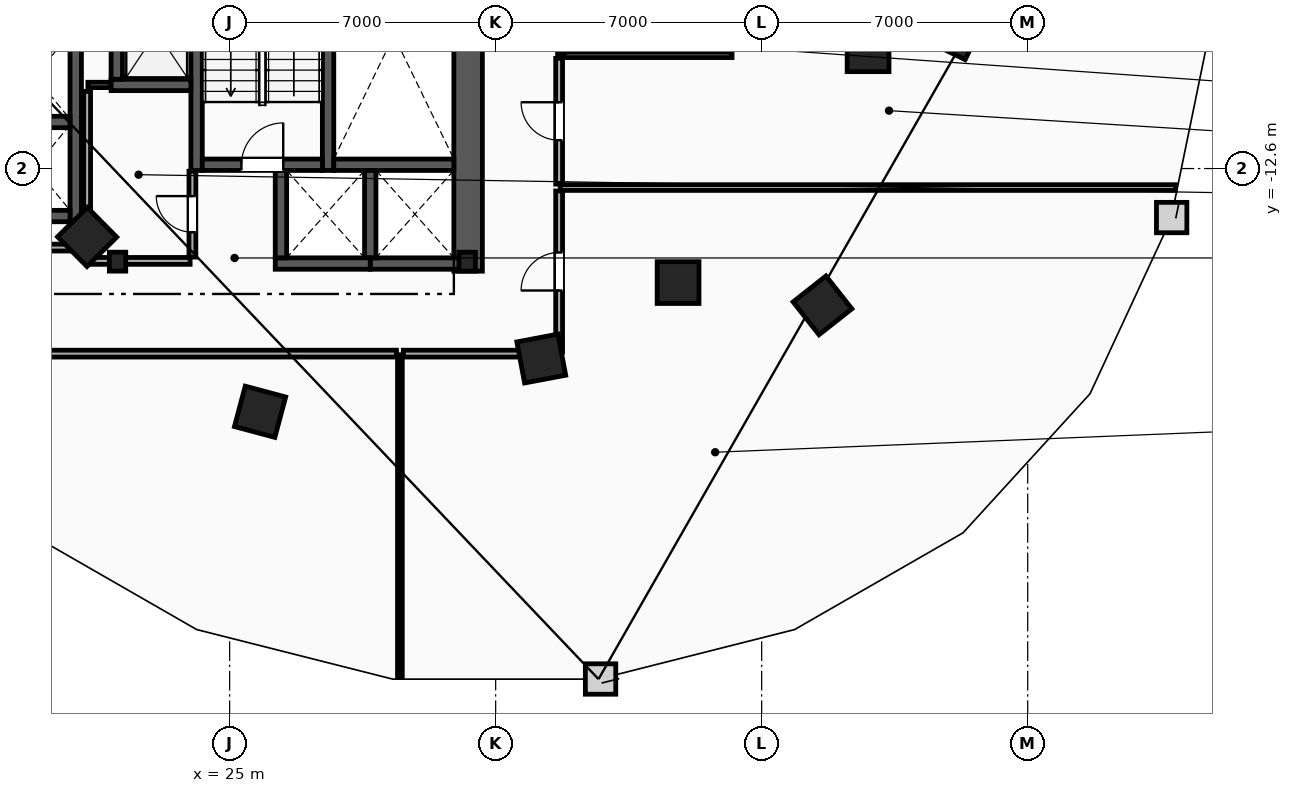
"""IFC4 building model, lengths in metres.
Left out: names, types, materials, properties, quantities, classifications, styles, units other than length and angle.
Written with IfcOpenShell. Run it as: python <this file> out.ifc"""

import sys

from ifc_helpers import new_model, si_unit, direction, frame, frame_2d, origin, origin_2d, place, context, subcontext, project, spatial, rectangle, i_section, extrude, element, fill, save


model = new_model("IFC4")
c1 = context("Model", 3, precision=1e-05, world=origin(), true_north=direction((0.0, 1.0)))
c2 = subcontext(c1, "Body", "Model", "MODEL_VIEW")
j1 = project(units=[si_unit("LENGTHUNIT", "METRE"), si_unit("PLANEANGLEUNIT", "RADIAN")], contexts=[c1])
p1 = place(None, origin())
s1 = spatial("IfcSite", under=j1, at=p1, CompositionType="ELEMENT")
p2 = place(p1, origin())
s2 = spatial("IfcBuilding", under=s1, at=p2, CompositionType="ELEMENT")
p3 = place(p2, frame((0.0, 0.0, 99.8)))
s3 = spatial("IfcBuildingStorey", under=s2, at=p3, CompositionType="ELEMENT", Elevation=99.8)
for number, where, z_axis, x_axis in (
    (1, (22.05, -15.05, 0.0), (0.0, 0.0, 1.0), (1.0, 0.0, 0.0)),
    (2, (31.25, -15.05, 0.0), (0.0, 0.0, 1.0), (1.0, 0.0, 0.0)),
):
    element("IfcColumn", number, at=place(p3, frame(where, z_axis=z_axis, x_axis=x_axis)), inside=s3, PredefinedType="COLUMN", context=c2, shape_type="SweptSolid", body=[
        extrude(i_section(OverallWidth=0.432, OverallDepth=0.498, WebThickness=0.056, FlangeThickness=0.089, FilletRadius=0.018, at=origin_2d()), origin(), (0.0, 0.0, 1.0), 3.6),
    ])
for number, where, z_axis, x_axis in (
    (3, (41.8, -9.5, 0.0), (0.0, 0.0, 1.0), (1.0, 0.0, 0.0)),
    (4, (36.8, -15.6, 0.0), (0.0, 0.0, 1.0), (1.0, 0.0, 0.0)),
    (5, (21.25, -14.4, 0.0), (0.0, 0.0, 1.0), (0.703, -0.711, 0.0)),
    (6, (25.8, -19.0, 0.0), (0.0, 0.0, 1.0), (0.966, -0.259, 0.0)),
    (7, (33.2, -17.6, 0.0), (0.0, 0.0, 1.0), (0.983, 0.186, 0.0)),
    (8, (40.6, -16.2, 0.0), (0.0, 0.0, 1.0), (0.785, 0.619, 0.0)),
    (9, (44.1, -9.0, 0.0), (0.0, 0.0, 1.0), (0.437, 0.899, 0.0)),
):
    element("IfcColumn", number, at=place(p3, frame(where, z_axis=z_axis, x_axis=x_axis)), inside=s3, PredefinedType="COLUMN", context=c2, shape_type="SweptSolid", body=[
        extrude(rectangle(XDim=1.1, YDim=1.1, at=origin_2d()), origin(), (0.0, 0.0, 1.0), 3.6),
    ])
p4 = place(p3, frame((31.275, -15.3, 0.0), z_axis=(0.0, 0.0, 1.0), x_axis=(0.0, 1.0, 0.0)))
e10 = element("IfcWall", 10, at=p4, inside=s3, PredefinedType="SHEAR", context=c2, shape_type="SweptSolid", body=[
    extrude(rectangle(XDim=13.33, YDim=0.75, at=frame_2d((6.665, 0.0))), origin(), (0.0, 0.0, 1.0), 3.3),
])
for number, where, z_axis, x_axis in (
    (11, (27.59, -12.65, 0.0), (0.0, 0.0, 1.0), (0.0, 1.0, 0.0)),
    (12, (24.13, -12.65, 0.0), (0.0, 0.0, 1.0), (0.0, 1.0, 0.0)),
):
    element("IfcWall", number, at=place(p3, frame(where, z_axis=z_axis, x_axis=x_axis)), inside=s3, PredefinedType="SHEAR", context=c2, shape_type="SweptSolid", body=[
        extrude(rectangle(XDim=10.68, YDim=0.3, at=frame_2d((5.34, 0.0))), origin(), (0.0, 0.0, 1.0), 3.3),
    ])
p5 = place(p3, frame((27.74, -12.5, 0.0), z_axis=(0.0, 0.0, 1.0), x_axis=(1.0, 0.0, 0.0)))
e13 = element("IfcWall", 13, at=p5, inside=s3, PredefinedType="SHEAR", context=c2, shape_type="SweptSolid", body=[
    extrude(rectangle(XDim=3.16, YDim=0.3, at=frame_2d((1.58, 0.0))), origin(), (0.0, 0.0, 1.0), 3.3),
])
p6 = place(p3, frame((24.28, -12.5, 0.0), z_axis=(0.0, 0.0, 1.0), x_axis=(1.0, 0.0, 0.0)))
e14 = element("IfcWall", 14, at=p6, inside=s3, PredefinedType="SHEAR", context=c2, shape_type="SweptSolid", body=[
    extrude(rectangle(XDim=3.16, YDim=0.3, at=frame_2d((1.58, 0.0))), origin(), (0.0, 0.0, 1.0), 3.3),
])
p7 = place(p6, frame((1.03, 0.0, 0.0)))
e15 = element("IfcOpeningElement", 15, at=p7, cuts=e14, PredefinedType="OPENING", context=c2, shape_type="SweptSolid", body=[
    extrude(rectangle(XDim=1.1, YDim=2.15, at=frame_2d((0.55, 1.075))), frame((0.0, 0.16, 0.0), z_axis=(0.0, -1.0, 0.0), x_axis=(1.0, 0.0, 0.0)), (0.0, 0.0, 1.0), 0.32),
])
p8 = place(p3, frame((21.88, -10.4, 0.0), z_axis=(0.0, 0.0, 1.0), x_axis=(1.0, 0.0, 0.0)))
e16 = element("IfcWall", 16, at=p8, inside=s3, PredefinedType="SHEAR", context=c2, shape_type="SweptSolid", body=[
    extrude(rectangle(XDim=2.1, YDim=0.3, at=frame_2d((1.05, 0.0))), origin(), (0.0, 0.0, 1.0), 3.3),
])
for number, where, z_axis, x_axis in (
    (17, (22.03, -10.25, 0.0), (0.0, 0.0, 1.0), (0.0, 1.0, 0.0)),
    (18, (28.7, -15.1, 0.0), (0.0, 0.0, 1.0), (1.0, 0.0, 0.0)),
):
    element("IfcWall", number, at=place(p3, frame(where, z_axis=z_axis, x_axis=x_axis)), inside=s3, PredefinedType="SHEAR", context=c2, shape_type="SweptSolid", body=[
        extrude(rectangle(XDim=2.5, YDim=0.3, at=frame_2d((1.25, 0.0))), origin(), (0.0, 0.0, 1.0), 3.3),
    ])
p9 = place(p3, frame((28.7, -14.95, 0.0), z_axis=(0.0, 0.0, 1.0), x_axis=(0.0, 1.0, 0.0)))
e19 = element("IfcWall", 19, at=p9, inside=s3, PredefinedType="SHEAR", context=c2, shape_type="SweptSolid", body=[
    extrude(rectangle(XDim=2.3, YDim=0.3, at=frame_2d((1.15, 0.0))), origin(), (0.0, 0.0, 1.0), 3.3),
])
p10 = place(p3, frame((26.2, -15.1, 0.0), z_axis=(0.0, 0.0, 1.0), x_axis=(1.0, 0.0, 0.0)))
e20 = element("IfcWall", 20, at=p10, inside=s3, PredefinedType="SHEAR", context=c2, shape_type="SweptSolid", body=[
    extrude(rectangle(XDim=2.5, YDim=0.3, at=frame_2d((1.25, 0.0))), origin(), (0.0, 0.0, 1.0), 3.3),
])
p11 = place(p3, frame((26.35, -14.95, 0.0), z_axis=(0.0, 0.0, 1.0), x_axis=(0.0, 1.0, 0.0)))
e21 = element("IfcWall", 21, at=p11, inside=s3, PredefinedType="SHEAR", context=c2, shape_type="SweptSolid", body=[
    extrude(rectangle(XDim=2.3, YDim=0.3, at=frame_2d((1.15, 0.0))), origin(), (0.0, 0.0, 1.0), 3.3),
])
p12 = place(p3, frame((20.95, -14.0, 0.0), z_axis=(0.0, 0.0, 1.0), x_axis=(0.0, 1.0, 0.0)))
e22 = element("IfcWall", 22, at=p12, inside=s3, PredefinedType="SHEAR", context=c2, shape_type="SweptSolid", body=[
    extrude(rectangle(XDim=10.05, YDim=0.3, at=frame_2d((5.025, 0.0))), origin(), (0.0, 0.0, 1.0), 3.3),
])
for number, where, z_axis, x_axis in (
    (23, (18.95, -13.85, 0.0), (0.0, 0.0, 1.0), (1.0, 0.0, 0.0)),
    (24, (18.95, -11.375, 0.0), (0.0, 0.0, 1.0), (1.0, 0.0, 0.0)),
):
    element("IfcWall", number, at=place(p3, frame(where, z_axis=z_axis, x_axis=x_axis)), inside=s3, PredefinedType="SHEAR", context=c2, shape_type="SweptSolid", body=[
        extrude(rectangle(XDim=1.85, YDim=0.3, at=frame_2d((0.925, 0.0))), origin(), (0.0, 0.0, 1.0), 3.3),
    ])
p13 = place(p3, frame((21.27, -10.4, 0.0), z_axis=(0.0, 0.0, 1.0), x_axis=(1.0, 0.0, 0.0)))
e25 = element("IfcWall", 25, at=p13, inside=s3, PredefinedType="PARTITIONING", context=c2, shape_type="SweptSolid", body=[
    extrude(rectangle(XDim=0.59, YDim=0.14, at=frame_2d((0.295, 0.0))), origin(), (0.0, 0.0, 1.0), 3.3),
])
p14 = place(p3, frame((21.25, -14.93, 0.0), z_axis=(0.0, 0.0, 1.0), x_axis=(0.0, 1.0, 0.0)))
e26 = element("IfcWall", 26, at=p14, inside=s3, PredefinedType="PARTITIONING", context=c2, shape_type="SweptSolid", body=[
    extrude(rectangle(XDim=4.36, YDim=0.18, at=frame_2d((2.18, 0.0))), origin(), (0.0, 0.0, 1.0), 3.3),
])
p15 = place(p3, frame((21.35, -15.03, 0.0), z_axis=(0.0, 0.0, 1.0), x_axis=(1.0, 0.0, 0.0)))
e27 = element("IfcWall", 27, at=p15, inside=s3, PredefinedType="PARTITIONING", context=c2, shape_type="SweptSolid", body=[
    extrude(rectangle(XDim=2.61, YDim=0.18, at=frame_2d((1.305, 0.0))), origin(), (0.0, 0.0, 1.0), 2.373),
])
p16 = place(p3, frame((24.02, -14.93, 0.0), z_axis=(0.0, 0.0, 1.0), x_axis=(0.0, 1.0, 0.0)))
e28 = element("IfcWall", 28, at=p16, inside=s3, PredefinedType="PARTITIONING", context=c2, shape_type="SweptSolid", body=[
    extrude(rectangle(XDim=2.26, YDim=0.18, at=frame_2d((1.13, 0.0))), origin(), (0.0, 0.0, 1.0), 3.3),
])
p17 = place(p16, frame((0.655, 0.0, 0.0)))
e29 = element("IfcOpeningElement", 29, at=p17, cuts=e28, PredefinedType="OPENING", context=c2, shape_type="SweptSolid", body=[
    extrude(rectangle(XDim=0.95, YDim=2.1, at=frame_2d((0.475, 1.05))), frame((0.0, 0.1, 0.0), z_axis=(0.0, -1.0, 0.0), x_axis=(1.0, 0.0, 0.0)), (0.0, 0.0, 1.0), 0.2),
])
p18 = place(p3, frame((33.74, -9.61, 0.0), z_axis=(0.0, 0.0, 1.0), x_axis=(1.0, 0.0, 0.0)))
e30 = element("IfcWall", 30, at=p18, inside=s3, PredefinedType="PARTITIONING", context=c2, shape_type="SweptSolid", body=[
    extrude(rectangle(XDim=4.48, YDim=0.14, at=frame_2d((2.24, 0.0))), origin(), (0.0, 0.0, 1.0), 3.3),
])
p19 = place(p3, frame((33.72, -9.59, 0.0), z_axis=(0.0, 0.0, 1.0), x_axis=(0.0, 1.0, 0.0)))
e31 = element("IfcWall", 31, at=p19, inside=s3, PredefinedType="PARTITIONING", context=c2, shape_type="SweptSolid", body=[
    extrude(rectangle(XDim=4.16, YDim=0.18, at=frame_2d((2.08, 0.0))), origin(), (0.0, 0.0, 1.0), 3.3),
])
p20 = place(p19, frame((1.58, 0.0, 0.0)))
e32 = element("IfcOpeningElement", 32, at=p20, cuts=e31, PredefinedType="OPENING", context=c2, shape_type="SweptSolid", body=[
    extrude(rectangle(XDim=1.0, YDim=2.15, at=frame_2d((0.5, 1.075))), frame((0.0, 0.1, 0.0), z_axis=(0.0, -1.0, 0.0), x_axis=(1.0, 0.0, 0.0)), (0.0, 0.0, 1.0), 0.2),
])
p21 = place(p3, frame((33.7, -13.1, 0.0), z_axis=(0.0, 0.0, 1.0), x_axis=(1.0, 0.0, 0.0)))
e33 = element("IfcWall", 33, at=p21, inside=s3, PredefinedType="PARTITIONING", context=c2, shape_type="SweptSolid", body=[
    extrude(rectangle(XDim=16.19, YDim=0.15, at=frame_2d((8.095, 0.0))), origin(), (0.0, 0.0, 1.0), 3.3),
])
p22 = place(p3, frame((29.48, -25.985, 0.0), z_axis=(0.0, 0.0, 1.0), x_axis=(0.0, 1.0, 0.0)))
e34 = element("IfcWall", 34, at=p22, inside=s3, PredefinedType="PARTITIONING", context=c2, shape_type="SweptSolid", body=[
    extrude(rectangle(XDim=8.485, YDim=0.125, at=frame_2d((4.243, 0.0))), origin(), (0.0, 0.0, 1.0), 3.3),
])
p23 = place(p3, frame((33.67, -17.428, 0.0), z_axis=(0.0, 0.0, 1.0), x_axis=(0.0, 1.0, 0.0)))
e35 = element("IfcWall", 35, at=p23, inside=s3, PredefinedType="PARTITIONING", context=c2, shape_type="SweptSolid", body=[
    extrude(rectangle(XDim=4.239, YDim=0.18, at=frame_2d((2.119, 0.0))), origin(), (0.0, 0.0, 1.0), 3.3),
])
p24 = place(p23, frame((1.619, 0.0, 0.0)))
e36 = element("IfcOpeningElement", 36, at=p24, cuts=e35, PredefinedType="OPENING", context=c2, shape_type="SweptSolid", body=[
    extrude(rectangle(XDim=1.0, YDim=2.15, at=frame_2d((0.5, 1.075))), frame((0.0, 0.1, 0.0), z_axis=(0.0, -1.0, 0.0), x_axis=(1.0, 0.0, 0.0)), (0.0, 0.0, 1.0), 0.2),
])
p25 = place(p3, frame((29.57, -17.47, 0.0), z_axis=(0.0, 0.0, 1.0), x_axis=(1.0, 0.0, 0.0)))
e37 = element("IfcWall", 37, at=p25, inside=s3, PredefinedType="PARTITIONING", context=c2, shape_type="SweptSolid", body=[
    extrude(rectangle(XDim=4.058, YDim=0.18, at=frame_2d((2.029, 0.0))), origin(), (0.0, 0.0, 1.0), 3.3),
])
p26 = place(p3, frame((33.67, -13.01, 0.0), z_axis=(0.0, 0.0, 1.0), x_axis=(0.0, 1.0, 0.0)))
e38 = element("IfcWall", 38, at=p26, inside=s3, PredefinedType="PARTITIONING", context=c2, shape_type="SweptSolid", body=[
    extrude(rectangle(XDim=3.309, YDim=0.18, at=frame_2d((1.654, 0.0))), origin(), (0.0, 0.0, 1.0), 3.3),
])
p27 = place(p26, frame((1.154, 0.0, 0.0)))
e39 = element("IfcOpeningElement", 39, at=p27, cuts=e38, PredefinedType="OPENING", context=c2, shape_type="SweptSolid", body=[
    extrude(rectangle(XDim=1.0, YDim=2.15, at=frame_2d((0.5, 1.075))), frame((0.0, 0.1, 0.0), z_axis=(0.0, -1.0, 0.0), x_axis=(1.0, 0.0, 0.0)), (0.0, 0.0, 1.0), 0.2),
])
p28 = place(p3, frame((16.822, -17.47, 0.0), z_axis=(0.0, 0.0, 1.0), x_axis=(1.0, 0.0, 0.0)))
e40 = element("IfcWall", 40, at=p28, inside=s3, PredefinedType="PARTITIONING", context=c2, shape_type="SweptSolid", body=[
    extrude(rectangle(XDim=12.568, YDim=0.18, at=frame_2d((6.284, 0.0))), origin(), (0.0, 0.0, 1.0), 3.3),
])
p29 = place(p3, frame((21.178, -14.68, 0.0), z_axis=(0.0, 0.0, 1.0), x_axis=(-1.0, 0.0, 0.0)))
e41 = element("IfcWall", 41, at=p29, inside=s3, PredefinedType="PARTITIONING", context=c2, shape_type="SweptSolid", body=[
    extrude(rectangle(XDim=4.357, YDim=0.18, at=frame_2d((2.178, 0.0))), origin(), (0.0, 0.0, 1.0), 3.3),
])
p30 = place(p7, origin())
e42 = element("IfcDoor", 42, at=p30, inside=s3, OperationType="SINGLE_SWING_RIGHT", PredefinedType="DOOR", context=c2, shape_type="SweptSolid", body=[
    extrude(rectangle(XDim=1.1, YDim=2.15, at=frame_2d((0.55, 1.075))), frame((0.0, 0.025, 0.0), z_axis=(0.0, -1.0, 0.0), x_axis=(1.0, 0.0, 0.0)), (0.0, 0.0, 1.0), 0.05),
])
fill(e15, e42)
p31 = place(p24, origin())
e43 = element("IfcDoor", 43, at=p31, inside=s3, OperationType="SINGLE_SWING_LEFT", PredefinedType="DOOR", context=c2, shape_type="SweptSolid", body=[
    extrude(rectangle(XDim=1.0, YDim=2.15, at=frame_2d((0.5, 1.075))), frame((0.0, 0.025, 0.0), z_axis=(0.0, -1.0, 0.0), x_axis=(1.0, 0.0, 0.0)), (0.0, 0.0, 1.0), 0.05),
])
fill(e36, e43)
p32 = place(p27, origin())
e44 = element("IfcDoor", 44, at=p32, inside=s3, OperationType="SINGLE_SWING_RIGHT", PredefinedType="DOOR", context=c2, shape_type="SweptSolid", body=[
    extrude(rectangle(XDim=1.0, YDim=2.15, at=frame_2d((0.5, 1.075))), frame((0.0, 0.025, 0.0), z_axis=(0.0, -1.0, 0.0), x_axis=(1.0, 0.0, 0.0)), (0.0, 0.0, 1.0), 0.05),
])
fill(e39, e44)
p33 = place(p17, origin())
e45 = element("IfcDoor", 45, at=p33, inside=s3, OperationType="SINGLE_SWING_RIGHT", PredefinedType="DOOR", context=c2, shape_type="SweptSolid", body=[
    extrude(rectangle(XDim=0.95, YDim=2.1, at=frame_2d((0.475, 1.05))), frame((0.0, 0.025, 0.0), z_axis=(0.0, -1.0, 0.0), x_axis=(1.0, 0.0, 0.0)), (0.0, 0.0, 1.0), 0.05),
])
fill(e29, e45)
save(model, sys.argv[1])
